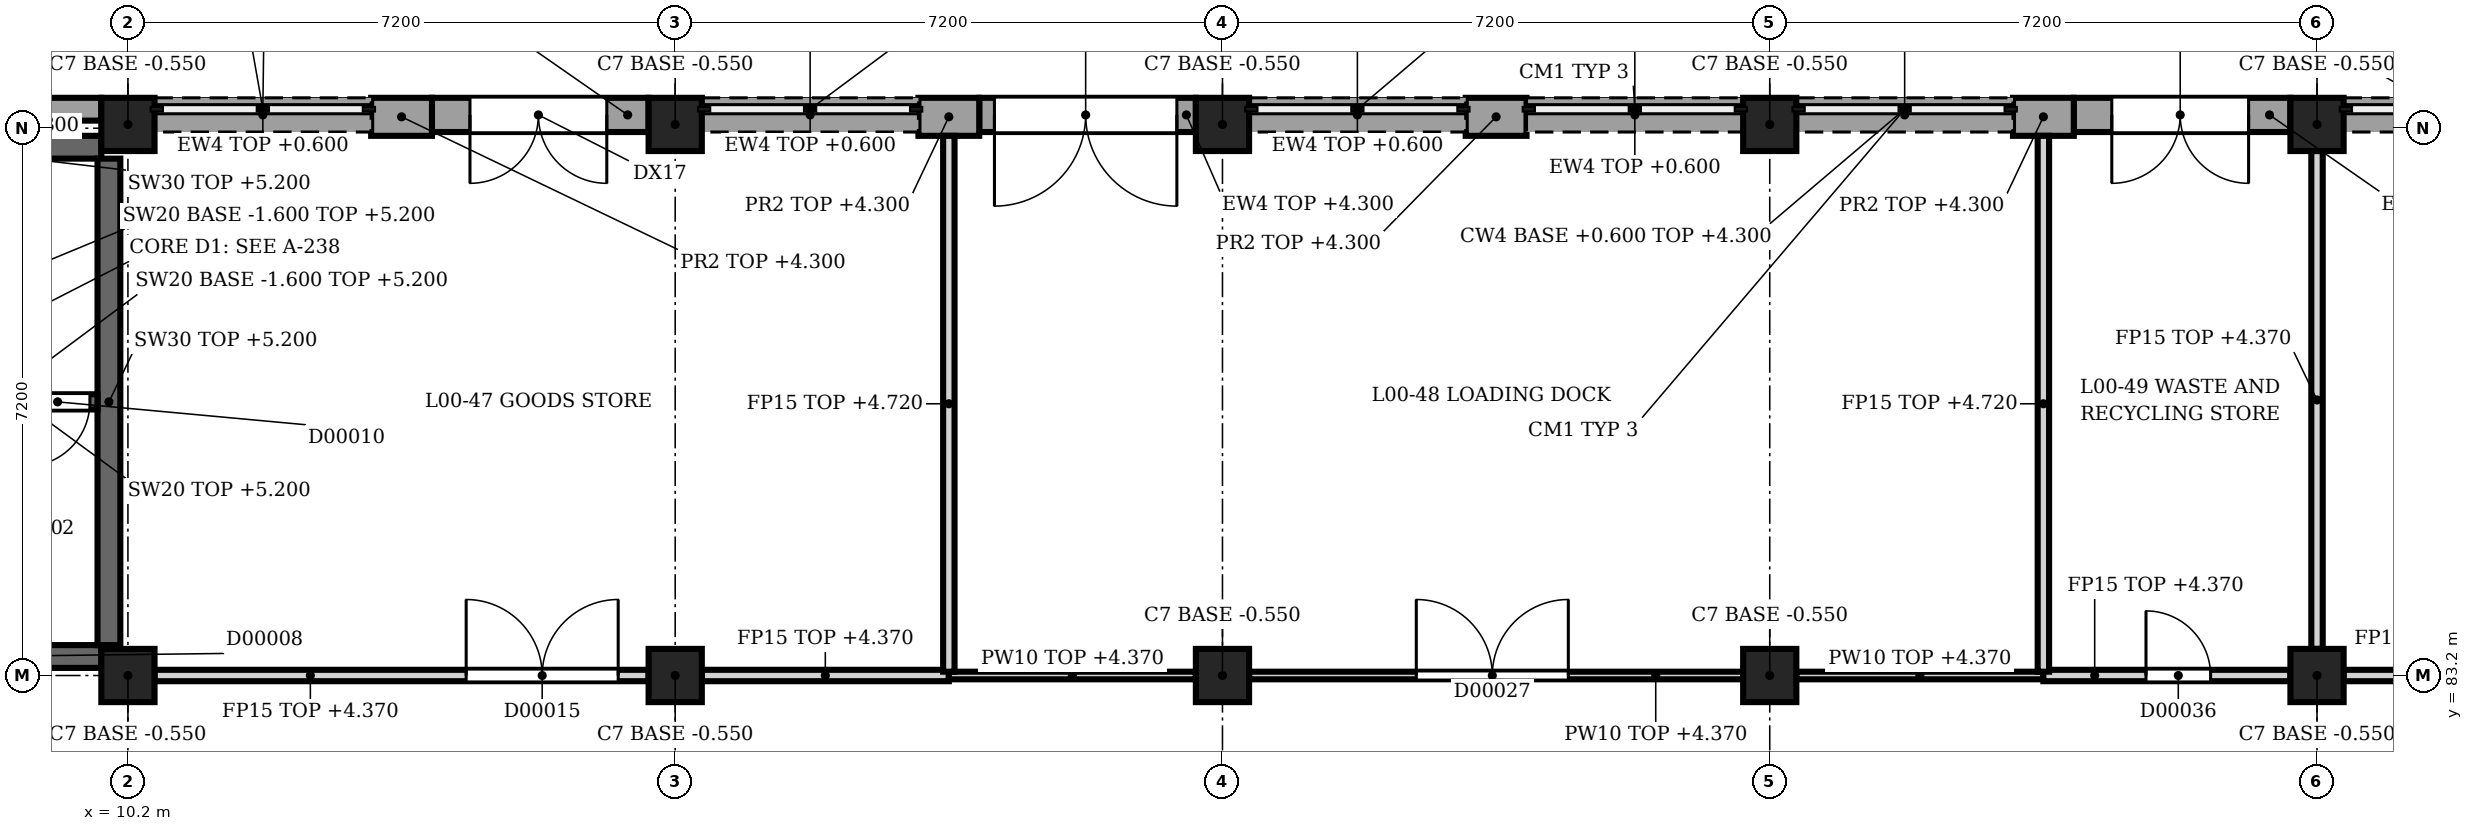
"""IFC4 building model, lengths in metres.
Left out: names, types, materials, properties, quantities, classifications, styles, units other than length and angle.
Written with IfcOpenShell. Run it as: python <this file> out.ifc"""

import sys

from ifc_helpers import new_model, si_unit, direction, frame, frame_2d, origin, origin_2d, place, context, subcontext, project, spatial, rectangle, extrude, element, fill, save


model = new_model("IFC4")
c1 = context("Model", 3, precision=1e-05, world=origin(), true_north=direction((0.0, 1.0)))
c2 = subcontext(c1, "Body", "Model", "MODEL_VIEW")
j1 = project(units=[si_unit("LENGTHUNIT", "METRE"), si_unit("PLANEANGLEUNIT", "RADIAN")], contexts=[c1])
p1 = place(None, origin())
s1 = spatial("IfcSite", under=j1, at=p1, CompositionType="ELEMENT")
p2 = place(p1, origin())
s2 = spatial("IfcBuilding", under=s1, at=p2, CompositionType="ELEMENT")
p3 = place(p2, origin())
s3 = spatial("IfcBuildingStorey", under=s2, at=p3, CompositionType="ELEMENT", Elevation=0.0)
for number, where, z_axis, x_axis in (
    (1, (10.2, 83.2, -0.55), (0.0, 0.0, 1.0), (1.0, 0.0, 0.0)),
    (2, (10.2, 90.45, -0.55), (0.0, 0.0, 1.0), (1.0, 0.0, 0.0)),
    (3, (17.4, 83.2, -0.55), (0.0, 0.0, 1.0), (1.0, 0.0, 0.0)),
    (4, (17.4, 90.45, -0.55), (0.0, 0.0, 1.0), (1.0, 0.0, 0.0)),
    (5, (24.6, 83.2, -0.55), (0.0, 0.0, 1.0), (1.0, 0.0, 0.0)),
    (6, (24.6, 90.45, -0.55), (0.0, 0.0, 1.0), (1.0, 0.0, 0.0)),
    (7, (31.8, 83.2, -0.55), (0.0, 0.0, 1.0), (1.0, 0.0, 0.0)),
    (8, (31.8, 90.45, -0.55), (0.0, 0.0, 1.0), (1.0, 0.0, 0.0)),
    (9, (39.0, 83.2, -0.55), (0.0, 0.0, 1.0), (1.0, 0.0, 0.0)),
    (10, (39.0, 90.45, -0.55), (0.0, 0.0, 1.0), (1.0, 0.0, 0.0)),
):
    element("IfcColumn", number, at=place(p3, frame(where, z_axis=z_axis, x_axis=x_axis)), inside=s3, PredefinedType="COLUMN", context=c2, shape_type="SweptSolid", body=[
        extrude(rectangle(XDim=0.7, YDim=0.7, at=origin_2d()), origin(), (0.0, 0.0, 1.0), 5.95),
    ])
p4 = place(p3, frame((13.4, 90.55, 0.0), z_axis=(0.0, 0.0, 1.0), x_axis=(1.0, 0.0, 0.0)))
e11 = element("IfcWall", 11, at=p4, inside=s3, PredefinedType="SOLIDWALL", context=c2, shape_type="SweptSolid", body=[
    extrude(rectangle(XDim=0.8, YDim=0.5, at=frame_2d((0.4, 0.0))), origin(), (0.0, 0.0, 1.0), 4.3),
])
p5 = place(p3, frame((20.6, 90.55, 0.0), z_axis=(0.0, 0.0, 1.0), x_axis=(1.0, 0.0, 0.0)))
e12 = element("IfcWall", 12, at=p5, inside=s3, PredefinedType="SOLIDWALL", context=c2, shape_type="SweptSolid", body=[
    extrude(rectangle(XDim=0.8, YDim=0.5, at=frame_2d((0.4, 0.0))), origin(), (0.0, 0.0, 1.0), 4.3),
])
for number, where, z_axis, x_axis in (
    (13, (27.8, 90.55, 0.0), (0.0, 0.0, 1.0), (1.0, 0.0, 0.0)),
    (14, (35.0, 90.55, 0.0), (0.0, 0.0, 1.0), (1.0, 0.0, 0.0)),
):
    element("IfcWall", number, at=place(p3, frame(where, z_axis=z_axis, x_axis=x_axis)), inside=s3, PredefinedType="SOLIDWALL", context=c2, shape_type="SweptSolid", body=[
        extrude(rectangle(XDim=0.8, YDim=0.5, at=frame_2d((0.4, 0.0))), origin(), (0.0, 0.0, 1.0), 4.3),
    ])
p6 = place(p3, frame((7.0, 90.65, 0.0), z_axis=(0.0, 0.0, 1.0), x_axis=(1.0, 0.0, 0.0)))
e15 = element("IfcWall", 15, at=p6, inside=s3, PredefinedType="SOLIDWALL", context=c2, shape_type="SweptSolid", body=[
    extrude(rectangle(XDim=2.85, YDim=0.3, at=frame_2d((1.425, 0.0))), origin(), (0.0, 0.0, 1.0), 4.3),
])
p7 = place(p3, frame((10.55, 90.575, 0.0), z_axis=(0.0, 0.0, 1.0), x_axis=(1.0, 0.0, 0.0)))
e16 = element("IfcWall", 16, at=p7, inside=s3, PredefinedType="SOLIDWALL", context=c2, shape_type="SweptSolid", body=[
    extrude(rectangle(XDim=2.85, YDim=0.45, at=frame_2d((1.425, 0.0))), origin(), (0.0, 0.0, 1.0), 0.6),
])
p8 = place(p3, frame((14.2, 90.575, 0.0), z_axis=(0.0, 0.0, 1.0), x_axis=(1.0, 0.0, 0.0)))
e17 = element("IfcWall", 17, at=p8, inside=s3, PredefinedType="SOLIDWALL", context=c2, shape_type="SweptSolid", body=[
    extrude(rectangle(XDim=2.85, YDim=0.45, at=frame_2d((1.425, 0.0))), origin(), (0.0, 0.0, 1.0), 4.3),
])
p9 = place(p8, frame((0.5, 0.0, 0.0)))
e18 = element("IfcOpeningElement", 18, at=p9, cuts=e17, PredefinedType="OPENING", context=c2, shape_type="SweptSolid", body=[
    extrude(rectangle(XDim=1.8, YDim=2.2, at=frame_2d((0.9, 1.1))), frame((0.0, 0.235, 0.0), z_axis=(0.0, -1.0, 0.0), x_axis=(1.0, 0.0, 0.0)), (0.0, 0.0, 1.0), 0.47),
])
p10 = place(p3, frame((17.75, 90.575, 0.0), z_axis=(0.0, 0.0, 1.0), x_axis=(1.0, 0.0, 0.0)))
e19 = element("IfcWall", 19, at=p10, inside=s3, PredefinedType="SOLIDWALL", context=c2, shape_type="SweptSolid", body=[
    extrude(rectangle(XDim=2.85, YDim=0.45, at=frame_2d((1.425, 0.0))), origin(), (0.0, 0.0, 1.0), 0.6),
])
p11 = place(p3, frame((21.4, 90.575, 0.0), z_axis=(0.0, 0.0, 1.0), x_axis=(1.0, 0.0, 0.0)))
e20 = element("IfcWall", 20, at=p11, inside=s3, PredefinedType="SOLIDWALL", context=c2, shape_type="SweptSolid", body=[
    extrude(rectangle(XDim=2.85, YDim=0.45, at=frame_2d((1.425, 0.0))), origin(), (0.0, 0.0, 1.0), 4.3),
])
p12 = place(p11, frame((0.2, 0.0, 0.0)))
e21 = element("IfcOpeningElement", 21, at=p12, cuts=e20, PredefinedType="OPENING", context=c2, shape_type="SweptSolid", body=[
    extrude(rectangle(XDim=2.4, YDim=2.4, at=frame_2d((1.2, 1.2))), frame((0.0, 0.235, 0.0), z_axis=(0.0, -1.0, 0.0), x_axis=(1.0, 0.0, 0.0)), (0.0, 0.0, 1.0), 0.47),
])
p13 = place(p3, frame((24.95, 90.575, 0.0), z_axis=(0.0, 0.0, 1.0), x_axis=(1.0, 0.0, 0.0)))
e22 = element("IfcWall", 22, at=p13, inside=s3, PredefinedType="SOLIDWALL", context=c2, shape_type="SweptSolid", body=[
    extrude(rectangle(XDim=2.85, YDim=0.45, at=frame_2d((1.425, 0.0))), origin(), (0.0, 0.0, 1.0), 0.6),
])
p14 = place(p3, frame((28.6, 90.575, 0.0), z_axis=(0.0, 0.0, 1.0), x_axis=(1.0, 0.0, 0.0)))
e23 = element("IfcWall", 23, at=p14, inside=s3, PredefinedType="SOLIDWALL", context=c2, shape_type="SweptSolid", body=[
    extrude(rectangle(XDim=2.85, YDim=0.45, at=frame_2d((1.425, 0.0))), origin(), (0.0, 0.0, 1.0), 0.6),
])
p15 = place(p3, frame((32.15, 90.575, 0.0), z_axis=(0.0, 0.0, 1.0), x_axis=(1.0, 0.0, 0.0)))
e24 = element("IfcWall", 24, at=p15, inside=s3, PredefinedType="SOLIDWALL", context=c2, shape_type="SweptSolid", body=[
    extrude(rectangle(XDim=2.85, YDim=0.45, at=frame_2d((1.425, 0.0))), origin(), (0.0, 0.0, 1.0), 0.6),
])
p16 = place(p3, frame((35.8, 90.575, 0.0), z_axis=(0.0, 0.0, 1.0), x_axis=(1.0, 0.0, 0.0)))
e25 = element("IfcWall", 25, at=p16, inside=s3, PredefinedType="SOLIDWALL", context=c2, shape_type="SweptSolid", body=[
    extrude(rectangle(XDim=2.85, YDim=0.45, at=frame_2d((1.425, 0.0))), origin(), (0.0, 0.0, 1.0), 4.3),
])
p17 = place(p16, frame((0.5, 0.0, 0.0)))
e26 = element("IfcOpeningElement", 26, at=p17, cuts=e25, PredefinedType="OPENING", context=c2, shape_type="SweptSolid", body=[
    extrude(rectangle(XDim=1.8, YDim=2.2, at=frame_2d((0.9, 1.1))), frame((0.0, 0.235, 0.0), z_axis=(0.0, -1.0, 0.0), x_axis=(1.0, 0.0, 0.0)), (0.0, 0.0, 1.0), 0.47),
])
p18 = place(p3, frame((39.35, 90.575, 0.0), z_axis=(0.0, 0.0, 1.0), x_axis=(1.0, 0.0, 0.0)))
e27 = element("IfcWall", 27, at=p18, inside=s3, PredefinedType="SOLIDWALL", context=c2, shape_type="SweptSolid", body=[
    extrude(rectangle(XDim=2.85, YDim=0.45, at=frame_2d((1.425, 0.0))), origin(), (0.0, 0.0, 1.0), 0.6),
])
p19 = place(p3, frame((3.3, 83.45, 0.0), z_axis=(0.0, 0.0, 1.0), x_axis=(1.0, 0.0, 0.0)))
e28 = element("IfcWall", 28, at=p19, inside=s3, PredefinedType="SHEAR", context=c2, shape_type="SweptSolid", body=[
    extrude(rectangle(XDim=6.55, YDim=0.3, at=frame_2d((3.275, 0.0))), origin(), (0.0, 0.0, 1.0), 5.2),
])
p20 = place(p19, frame((4.3, 0.0, 0.0)))
e29 = element("IfcOpeningElement", 29, at=p20, cuts=e28, PredefinedType="OPENING", context=c2, shape_type="SweptSolid", body=[
    extrude(rectangle(XDim=1.2, YDim=2.1, at=frame_2d((0.6, 1.05))), frame((0.0, 0.16, 0.0), z_axis=(0.0, -1.0, 0.0), x_axis=(1.0, 0.0, 0.0)), (0.0, 0.0, 1.0), 0.32),
])
p21 = place(p3, frame((3.3, 90.15, 0.0), z_axis=(0.0, 0.0, 1.0), x_axis=(1.0, 0.0, 0.0)))
e30 = element("IfcWall", 30, at=p21, inside=s3, PredefinedType="SHEAR", context=c2, shape_type="SweptSolid", body=[
    extrude(rectangle(XDim=6.55, YDim=0.3, at=frame_2d((3.275, 0.0))), origin(), (0.0, 0.0, 1.0), 5.2),
])
p22 = place(p21, frame((0.95, 0.0, 0.0)))
e31 = element("IfcOpeningElement", 31, at=p22, cuts=e30, PredefinedType="OPENING", context=c2, shape_type="SweptSolid", body=[
    extrude(rectangle(XDim=1.1, YDim=2.1, at=frame_2d((0.55, 1.05))), frame((0.0, 0.16, 0.0), z_axis=(0.0, -1.0, 0.0), x_axis=(1.0, 0.0, 0.0)), (0.0, 0.0, 1.0), 0.32),
])
p23 = place(p3, frame((9.95, 83.6, 0.0), z_axis=(0.0, 0.0, 1.0), x_axis=(0.0, 1.0, 0.0)))
e32 = element("IfcWall", 32, at=p23, inside=s3, PredefinedType="SHEAR", context=c2, shape_type="SweptSolid", body=[
    extrude(rectangle(XDim=6.4, YDim=0.3, at=frame_2d((3.2, 0.0))), origin(), (0.0, 0.0, 1.0), 5.2),
])
p24 = place(p3, frame((9.8, 86.8, 0.0), z_axis=(0.0, 0.0, 1.0), x_axis=(-1.0, 0.0, 0.0)))
e33 = element("IfcWall", 33, at=p24, inside=s3, PredefinedType="SHEAR", context=c2, shape_type="SweptSolid", body=[
    extrude(rectangle(XDim=1.05, YDim=0.2, at=frame_2d((0.525, 0.0))), origin(), (0.0, 0.0, 1.0), 5.2),
])
p25 = place(p24, frame((0.1, 0.0, 0.0)))
e34 = element("IfcOpeningElement", 34, at=p25, cuts=e33, PredefinedType="OPENING", context=c2, shape_type="SweptSolid", body=[
    extrude(rectangle(XDim=0.85, YDim=2.1, at=frame_2d((0.425, 1.05))), frame((0.0, 0.11, 0.0), z_axis=(0.0, -1.0, 0.0), x_axis=(1.0, 0.0, 0.0)), (0.0, 0.0, 1.0), 0.22),
])
p26 = place(p3, frame((10.55, 83.2, 0.0), z_axis=(0.0, 0.0, 1.0), x_axis=(1.0, 0.0, 0.0)))
e35 = element("IfcWall", 35, at=p26, inside=s3, PredefinedType="PARTITIONING", context=c2, shape_type="SweptSolid", body=[
    extrude(rectangle(XDim=6.5, YDim=0.15, at=frame_2d((3.25, 0.0))), origin(), (0.0, 0.0, 1.0), 4.37),
])
p27 = place(p26, frame((4.1, 0.0, 0.0)))
e36 = element("IfcOpeningElement", 36, at=p27, cuts=e35, PredefinedType="OPENING", context=c2, shape_type="SweptSolid", body=[
    extrude(rectangle(XDim=2.0, YDim=2.2, at=frame_2d((1.0, 1.1))), frame((0.0, 0.085, 0.0), z_axis=(0.0, -1.0, 0.0), x_axis=(1.0, 0.0, 0.0)), (0.0, 0.0, 1.0), 0.17),
])
p28 = place(p3, frame((17.75, 83.2, 0.0), z_axis=(0.0, 0.0, 1.0), x_axis=(1.0, 0.0, 0.0)))
e37 = element("IfcWall", 37, at=p28, inside=s3, PredefinedType="PARTITIONING", context=c2, shape_type="SweptSolid", body=[
    extrude(rectangle(XDim=3.25, YDim=0.15, at=frame_2d((1.625, 0.0))), origin(), (0.0, 0.0, 1.0), 4.37),
])
p29 = place(p3, frame((21.0, 83.2, 0.0), z_axis=(0.0, 0.0, 1.0), x_axis=(1.0, 0.0, 0.0)))
e38 = element("IfcWall", 38, at=p29, inside=s3, PredefinedType="PARTITIONING", context=c2, shape_type="SweptSolid", body=[
    extrude(rectangle(XDim=3.25, YDim=0.1, at=frame_2d((1.625, 0.0))), origin(), (0.0, 0.0, 1.0), 4.37),
])
p30 = place(p3, frame((24.95, 83.2, 0.0), z_axis=(0.0, 0.0, 1.0), x_axis=(1.0, 0.0, 0.0)))
e39 = element("IfcWall", 39, at=p30, inside=s3, PredefinedType="PARTITIONING", context=c2, shape_type="SweptSolid", body=[
    extrude(rectangle(XDim=6.5, YDim=0.1, at=frame_2d((3.25, 0.0))), origin(), (0.0, 0.0, 1.0), 4.37),
])
p31 = place(p30, frame((2.2, 0.0, 0.0)))
e40 = element("IfcOpeningElement", 40, at=p31, cuts=e39, PredefinedType="OPENING", context=c2, shape_type="SweptSolid", body=[
    extrude(rectangle(XDim=2.0, YDim=2.2, at=frame_2d((1.0, 1.1))), frame((0.0, 0.06, 0.0), z_axis=(0.0, -1.0, 0.0), x_axis=(1.0, 0.0, 0.0)), (0.0, 0.0, 1.0), 0.12),
])
p32 = place(p3, frame((32.15, 83.2, 0.0), z_axis=(0.0, 0.0, 1.0), x_axis=(1.0, 0.0, 0.0)))
e41 = element("IfcWall", 41, at=p32, inside=s3, PredefinedType="PARTITIONING", context=c2, shape_type="SweptSolid", body=[
    extrude(rectangle(XDim=3.25, YDim=0.1, at=frame_2d((1.625, 0.0))), origin(), (0.0, 0.0, 1.0), 4.37),
])
p33 = place(p3, frame((35.4, 83.2, 0.0), z_axis=(0.0, 0.0, 1.0), x_axis=(1.0, 0.0, 0.0)))
e42 = element("IfcWall", 42, at=p33, inside=s3, PredefinedType="PARTITIONING", context=c2, shape_type="SweptSolid", body=[
    extrude(rectangle(XDim=3.25, YDim=0.15, at=frame_2d((1.625, 0.0))), origin(), (0.0, 0.0, 1.0), 4.37),
])
p34 = place(p33, frame((1.35, 0.0, 0.0)))
e43 = element("IfcOpeningElement", 43, at=p34, cuts=e42, PredefinedType="OPENING", context=c2, shape_type="SweptSolid", body=[
    extrude(rectangle(XDim=0.85, YDim=2.1, at=frame_2d((0.425, 1.05))), frame((0.0, 0.085, 0.0), z_axis=(0.0, -1.0, 0.0), x_axis=(1.0, 0.0, 0.0)), (0.0, 0.0, 1.0), 0.17),
])
p35 = place(p3, frame((39.35, 83.2, 0.0), z_axis=(0.0, 0.0, 1.0), x_axis=(1.0, 0.0, 0.0)))
e44 = element("IfcWall", 44, at=p35, inside=s3, PredefinedType="PARTITIONING", context=c2, shape_type="SweptSolid", body=[
    extrude(rectangle(XDim=6.5, YDim=0.15, at=frame_2d((3.25, 0.0))), origin(), (0.0, 0.0, 1.0), 4.37),
])
p36 = place(p35, frame((2.7, 0.0, 0.0)))
e45 = element("IfcOpeningElement", 45, at=p36, cuts=e44, PredefinedType="OPENING", context=c2, shape_type="SweptSolid", body=[
    extrude(rectangle(XDim=1.0, YDim=2.3, at=frame_2d((0.5, 1.15))), frame((0.0, 0.085, 0.0), z_axis=(0.0, -1.0, 0.0), x_axis=(1.0, 0.0, 0.0)), (0.0, 0.0, 1.0), 0.17),
])
for number, where, z_axis, x_axis in (
    (46, (21.0, 83.25, 0.0), (0.0, 0.0, 1.0), (0.0, 1.0, 0.0)),
    (47, (35.4, 83.25, 0.0), (0.0, 0.0, 1.0), (0.0, 1.0, 0.0)),
):
    element("IfcWall", number, at=place(p3, frame(where, z_axis=z_axis, x_axis=x_axis)), inside=s3, PredefinedType="PARTITIONING", context=c2, shape_type="SweptSolid", body=[
        extrude(rectangle(XDim=7.05, YDim=0.15, at=frame_2d((3.525, 0.0))), origin(), (0.0, 0.0, 1.0), 4.72),
    ])
p37 = place(p3, frame((39.0, 83.55, 0.0), z_axis=(0.0, 0.0, 1.0), x_axis=(0.0, 1.0, 0.0)))
e48 = element("IfcWall", 48, at=p37, inside=s3, PredefinedType="PARTITIONING", context=c2, shape_type="SweptSolid", body=[
    extrude(rectangle(XDim=6.55, YDim=0.15, at=frame_2d((3.275, 0.0))), origin(), (0.0, 0.0, 1.0), 4.37),
])
p38 = place(p9, origin())
e49 = element("IfcDoor", 49, at=p38, inside=s3, OperationType="SINGLE_SWING_LEFT", PredefinedType="DOOR", context=c2, shape_type="SweptSolid", body=[
    extrude(rectangle(XDim=1.8, YDim=2.2, at=frame_2d((0.9, 1.1))), frame((0.0, 0.025, 0.0), z_axis=(0.0, -1.0, 0.0), x_axis=(1.0, 0.0, 0.0)), (0.0, 0.0, 1.0), 0.05),
])
fill(e18, e49)
p39 = place(p12, origin())
e50 = element("IfcDoor", 50, at=p39, inside=s3, OperationType="SINGLE_SWING_LEFT", PredefinedType="DOOR", context=c2, shape_type="SweptSolid", body=[
    extrude(rectangle(XDim=2.4, YDim=2.4, at=frame_2d((1.2, 1.2))), frame((0.0, 0.025, 0.0), z_axis=(0.0, -1.0, 0.0), x_axis=(1.0, 0.0, 0.0)), (0.0, 0.0, 1.0), 0.05),
])
fill(e21, e50)
p40 = place(p17, origin())
e51 = element("IfcDoor", 51, at=p40, inside=s3, OperationType="SINGLE_SWING_LEFT", PredefinedType="DOOR", context=c2, shape_type="SweptSolid", body=[
    extrude(rectangle(XDim=1.8, YDim=2.2, at=frame_2d((0.9, 1.1))), frame((0.0, 0.025, 0.0), z_axis=(0.0, -1.0, 0.0), x_axis=(1.0, 0.0, 0.0)), (0.0, 0.0, 1.0), 0.05),
])
fill(e26, e51)
p41 = place(p25, origin())
e52 = element("IfcDoor", 52, at=p41, inside=s3, OperationType="SINGLE_SWING_LEFT", PredefinedType="DOOR", context=c2, shape_type="SweptSolid", body=[
    extrude(rectangle(XDim=0.85, YDim=2.1, at=frame_2d((0.425, 1.05))), frame((0.0, 0.025, 0.0), z_axis=(0.0, -1.0, 0.0), x_axis=(1.0, 0.0, 0.0)), (0.0, 0.0, 1.0), 0.05),
])
fill(e34, e52)
p42 = place(p27, origin())
e53 = element("IfcDoor", 53, at=p42, inside=s3, OperationType="SINGLE_SWING_LEFT", PredefinedType="DOOR", context=c2, shape_type="SweptSolid", body=[
    extrude(rectangle(XDim=2.0, YDim=2.2, at=frame_2d((1.0, 1.1))), frame((0.0, 0.025, 0.0), z_axis=(0.0, -1.0, 0.0), x_axis=(1.0, 0.0, 0.0)), (0.0, 0.0, 1.0), 0.05),
])
fill(e36, e53)
p43 = place(p31, origin())
e54 = element("IfcDoor", 54, at=p43, inside=s3, OperationType="SINGLE_SWING_LEFT", PredefinedType="DOOR", context=c2, shape_type="SweptSolid", body=[
    extrude(rectangle(XDim=2.0, YDim=2.2, at=frame_2d((1.0, 1.1))), frame((0.0, 0.025, 0.0), z_axis=(0.0, -1.0, 0.0), x_axis=(1.0, 0.0, 0.0)), (0.0, 0.0, 1.0), 0.05),
])
fill(e40, e54)
p44 = place(p34, origin())
e55 = element("IfcDoor", 55, at=p44, inside=s3, OperationType="SINGLE_SWING_RIGHT", PredefinedType="DOOR", context=c2, shape_type="SweptSolid", body=[
    extrude(rectangle(XDim=0.85, YDim=2.1, at=frame_2d((0.425, 1.05))), frame((0.0, 0.025, 0.0), z_axis=(0.0, -1.0, 0.0), x_axis=(1.0, 0.0, 0.0)), (0.0, 0.0, 1.0), 0.05),
])
fill(e43, e55)
save(model, sys.argv[1])
